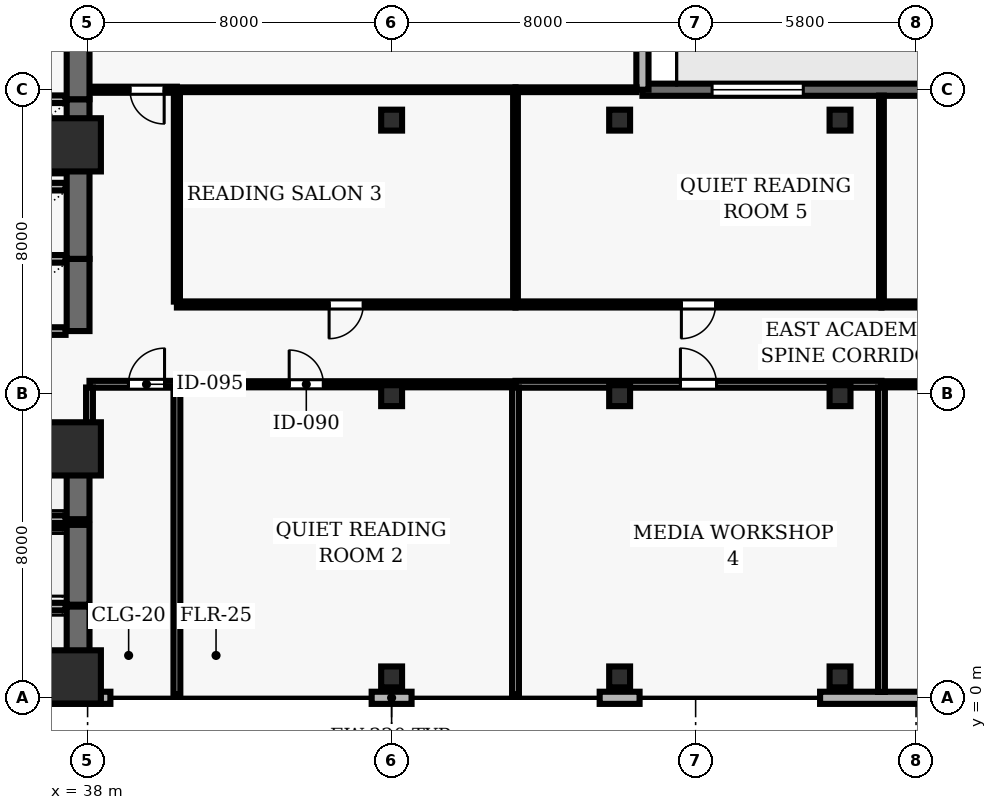
"""IFC4 building model, lengths in metres.
Left out: names, types, materials, properties, quantities, classifications, styles, units other than length and angle.
Written with IfcOpenShell. Run it as: python <this file> out.ifc"""

import sys

from ifc_helpers import new_model, si_unit, direction, frame, frame_2d, origin, origin_2d, place, context, subcontext, project, spatial, rectangle, hollow_rectangle, extrude, element, fill, save


model = new_model("IFC4")
c1 = context("Model", 3, precision=1e-05, world=origin(), true_north=direction((0.0, 1.0)))
c2 = subcontext(c1, "Body", "Model", "MODEL_VIEW")
j1 = project(units=[si_unit("LENGTHUNIT", "METRE"), si_unit("PLANEANGLEUNIT", "RADIAN")], contexts=[c1])
p1 = place(None, origin())
s1 = spatial("IfcSite", under=j1, at=p1, CompositionType="ELEMENT")
p2 = place(p1, origin())
s2 = spatial("IfcBuilding", under=s1, at=p2, CompositionType="ELEMENT")
p3 = place(p2, frame((0.0, 0.0, 54.4)))
s3 = spatial("IfcBuildingStorey", under=s2, at=p3, CompositionType="ELEMENT", Elevation=54.4)
for number, where, z_axis, x_axis in (
    (1, (37.65, 0.55, 0.0), (0.0, 0.0, 1.0), (1.0, 0.0, 0.0)),
    (2, (37.65, 6.55, 0.0), (0.0, 0.0, 1.0), (1.0, 0.0, 0.0)),
    (3, (37.65, 14.55, 0.0), (0.0, 0.0, 1.0), (1.0, 0.0, 0.0)),
):
    element("IfcColumn", number, at=place(p3, frame(where, z_axis=z_axis, x_axis=x_axis)), inside=s3, PredefinedType="COLUMN", context=c2, shape_type="SweptSolid", body=[
        extrude(rectangle(XDim=1.4, YDim=1.4, at=origin_2d()), origin(), (0.0, 0.0, 1.0), 3.9),
    ])
for number, where, z_axis, x_axis in (
    (4, (46.0, 0.55, 0.0), (0.0, 0.0, 1.0), (1.0, 0.0, 0.0)),
    (5, (46.0, 7.95, 0.0), (0.0, 0.0, 1.0), (1.0, 0.0, 0.0)),
    (6, (46.0, 15.2, 0.0), (0.0, 0.0, 1.0), (1.0, 0.0, 0.0)),
    (7, (52.0, 0.55, 0.0), (0.0, 0.0, 1.0), (1.0, 0.0, 0.0)),
    (8, (52.0, 7.95, 0.0), (0.0, 0.0, 1.0), (1.0, 0.0, 0.0)),
    (9, (52.0, 15.2, 0.0), (0.0, 0.0, 1.0), (1.0, 0.0, 0.0)),
    (10, (57.8, 0.55, 0.0), (0.0, 0.0, 1.0), (1.0, 0.0, 0.0)),
    (11, (57.8, 7.95, 0.0), (0.0, 0.0, 1.0), (1.0, 0.0, 0.0)),
    (12, (57.8, 15.2, 0.0), (0.0, 0.0, 1.0), (1.0, 0.0, 0.0)),
):
    element("IfcColumn", number, at=place(p3, frame(where, z_axis=z_axis, x_axis=x_axis)), inside=s3, PredefinedType="COLUMN", context=c2, shape_type="SweptSolid", body=[
        extrude(hollow_rectangle(XDim=0.55, YDim=0.55, WallThickness=0.025, at=origin_2d()), origin(), (0.0, 0.0, 1.0), 3.9),
    ])
p4 = place(p3, frame((30.8, 0.0, 0.0), z_axis=(0.0, 0.0, 1.0), x_axis=(1.0, 0.0, 0.0)))
e13 = element("IfcWall", 13, at=p4, inside=s3, PredefinedType="SOLIDWALL", context=c2, shape_type="SweptSolid", body=[
    extrude(rectangle(XDim=7.8, YDim=0.32, at=frame_2d((3.9, 0.0))), origin(), (0.0, 0.0, 1.0), 3.69),
])
for number, where, z_axis, x_axis in (
    (14, (45.475, 0.0, 0.0), (0.0, 0.0, 1.0), (1.0, 0.0, 0.0)),
    (15, (51.475, 0.0, 0.0), (0.0, 0.0, 1.0), (1.0, 0.0, 0.0)),
):
    element("IfcWall", number, at=place(p3, frame(where, z_axis=z_axis, x_axis=x_axis)), inside=s3, PredefinedType="SOLIDWALL", context=c2, shape_type="SweptSolid", body=[
        extrude(rectangle(XDim=1.05, YDim=0.32, at=frame_2d((0.525, 0.0))), origin(), (0.0, 0.0, 1.0), 3.69),
    ])
p5 = place(p3, frame((57.275, 0.0, 0.0), z_axis=(0.0, 0.0, 1.0), x_axis=(1.0, 0.0, 0.0)))
e16 = element("IfcWall", 16, at=p5, inside=s3, PredefinedType="SOLIDWALL", context=c2, shape_type="SweptSolid", body=[
    extrude(rectangle(XDim=16.225, YDim=0.32, at=frame_2d((8.113, 0.0))), origin(), (0.0, 0.0, 1.0), 3.69),
])
p6 = place(p3, frame((73.5, 16.0, 0.0), z_axis=(0.0, 0.0, 1.0), x_axis=(-1.0, 0.0, 0.0)))
e17 = element("IfcWall", 17, at=p6, inside=s3, PredefinedType="SOLIDWALL", context=c2, shape_type="SweptSolid", body=[
    extrude(rectangle(XDim=20.9, YDim=0.32, at=frame_2d((10.45, 0.0))), origin(), (0.0, 0.0, 1.0), 3.69),
])
p7 = place(p6, frame((12.05, 0.0, 0.0)))
e18 = element("IfcOpeningElement", 18, at=p7, cuts=e17, PredefinedType="OPENING", context=c2, shape_type="SweptSolid", body=[
    extrude(rectangle(XDim=1.0, YDim=2.2, at=frame_2d((0.5, 1.1))), frame((0.0, 0.17, 0.0), z_axis=(0.0, -1.0, 0.0), x_axis=(1.0, 0.0, 0.0)), (0.0, 0.0, 1.0), 0.34),
])
p8 = place(p6, frame((1.833, 0.0, 0.9)))
e19 = element("IfcOpeningElement", 19, at=p8, cuts=e17, PredefinedType="OPENING", context=c2, shape_type="SweptSolid", body=[
    extrude(rectangle(XDim=2.4, YDim=1.6, at=frame_2d((1.2, 0.8))), frame((0.0, 0.17, 0.0), z_axis=(0.0, -1.0, 0.0), x_axis=(1.0, 0.0, 0.0)), (0.0, 0.0, 1.0), 0.34),
])
p9 = place(p6, frame((16.667, 0.0, 0.9)))
e20 = element("IfcOpeningElement", 20, at=p9, cuts=e17, PredefinedType="OPENING", context=c2, shape_type="SweptSolid", body=[
    extrude(rectangle(XDim=2.4, YDim=1.6, at=frame_2d((1.2, 0.8))), frame((0.0, 0.17, 0.0), z_axis=(0.0, -1.0, 0.0), x_axis=(1.0, 0.0, 0.0)), (0.0, 0.0, 1.0), 0.34),
])
p10 = place(p3, frame((52.6, 16.0, 0.0), z_axis=(0.0, 0.0, 1.0), x_axis=(0.0, 1.0, 0.0)))
e21 = element("IfcWall", 21, at=p10, inside=s3, PredefinedType="SOLIDWALL", context=c2, shape_type="SweptSolid", body=[
    extrude(rectangle(XDim=10.095, YDim=0.32, at=frame_2d((5.047, 0.0))), origin(), (0.0, 0.0, 1.0), 3.69),
])
p11 = place(p10, frame((4.297, 0.0, 0.9)))
e22 = element("IfcOpeningElement", 22, at=p11, cuts=e21, PredefinedType="OPENING", context=c2, shape_type="SweptSolid", body=[
    extrude(rectangle(XDim=1.5, YDim=1.8, at=frame_2d((0.75, 0.9))), frame((0.0, 0.17, 0.0), z_axis=(0.0, -1.0, 0.0), x_axis=(1.0, 0.0, 0.0)), (0.0, 0.0, 1.0), 0.34),
])
p12 = place(p3, frame((37.75, 0.3, 0.0), z_axis=(0.0, 0.0, 1.0), x_axis=(0.0, 1.0, 0.0)))
e23 = element("IfcWall", 23, at=p12, inside=s3, PredefinedType="SHEAR", context=c2, shape_type="SweptSolid", body=[
    extrude(rectangle(XDim=2.1, YDim=0.6, at=frame_2d((1.05, 0.0))), origin(), (0.0, 0.0, 1.0), 3.69),
])
for number, where, z_axis, x_axis in (
    (24, (35.28, 0.3, 0.0), (0.0, 0.0, 1.0), (1.0, 0.0, 0.0)),
    (25, (37.42, 2.4, 0.0), (0.0, 0.0, 1.0), (-1.0, 0.0, 0.0)),
):
    element("IfcWall", number, at=place(p3, frame(where, z_axis=z_axis, x_axis=x_axis)), inside=s3, PredefinedType="SOLIDWALL", context=c2, shape_type="SweptSolid", body=[
        extrude(rectangle(XDim=2.14, YDim=0.2, at=frame_2d((1.07, 0.0))), origin(), (0.0, 0.0, 1.0), 3.69),
    ])
p13 = place(p3, frame((37.75, 2.45, 0.0), z_axis=(0.0, 0.0, 1.0), x_axis=(0.0, 1.0, 0.0)))
e26 = element("IfcWall", 26, at=p13, inside=s3, PredefinedType="SHEAR", context=c2, shape_type="SweptSolid", body=[
    extrude(rectangle(XDim=2.1, YDim=0.6, at=frame_2d((1.05, 0.0))), origin(), (0.0, 0.0, 1.0), 3.69),
])
p14 = place(p3, frame((37.42, 4.55, 0.0), z_axis=(0.0, 0.0, 1.0), x_axis=(-1.0, 0.0, 0.0)))
e27 = element("IfcWall", 27, at=p14, inside=s3, PredefinedType="SOLIDWALL", context=c2, shape_type="SweptSolid", body=[
    extrude(rectangle(XDim=2.14, YDim=0.2, at=frame_2d((1.07, 0.0))), origin(), (0.0, 0.0, 1.0), 3.69),
])
p15 = place(p3, frame((37.75, 4.7, 0.0), z_axis=(0.0, 0.0, 1.0), x_axis=(0.0, 1.0, 0.0)))
e28 = element("IfcWall", 28, at=p15, inside=s3, PredefinedType="SHEAR", context=c2, shape_type="SweptSolid", body=[
    extrude(rectangle(XDim=2.25, YDim=0.6, at=frame_2d((1.125, 0.0))), origin(), (0.0, 0.0, 1.0), 3.69),
])
for number, where, z_axis, x_axis in (
    (29, (35.28, 4.7, 0.0), (0.0, 0.0, 1.0), (1.0, 0.0, 0.0)),
    (30, (37.42, 6.95, 0.0), (0.0, 0.0, 1.0), (-1.0, 0.0, 0.0)),
):
    element("IfcWall", number, at=place(p3, frame(where, z_axis=z_axis, x_axis=x_axis)), inside=s3, PredefinedType="SOLIDWALL", context=c2, shape_type="SweptSolid", body=[
        extrude(rectangle(XDim=2.14, YDim=0.2, at=frame_2d((1.07, 0.0))), origin(), (0.0, 0.0, 1.0), 3.69),
    ])
p16 = place(p3, frame((37.75, 9.65, 0.0), z_axis=(0.0, 0.0, 1.0), x_axis=(0.0, 1.0, 0.0)))
e31 = element("IfcWall", 31, at=p16, inside=s3, PredefinedType="SHEAR", context=c2, shape_type="SweptSolid", body=[
    extrude(rectangle(XDim=1.9, YDim=0.6, at=frame_2d((0.95, 0.0))), origin(), (0.0, 0.0, 1.0), 3.69),
])
for number, where, z_axis, x_axis in (
    (32, (35.28, 9.65, 0.0), (0.0, 0.0, 1.0), (1.0, 0.0, 0.0)),
    (33, (37.42, 11.55, 0.0), (0.0, 0.0, 1.0), (-1.0, 0.0, 0.0)),
):
    element("IfcWall", number, at=place(p3, frame(where, z_axis=z_axis, x_axis=x_axis)), inside=s3, PredefinedType="SOLIDWALL", context=c2, shape_type="SweptSolid", body=[
        extrude(rectangle(XDim=2.14, YDim=0.2, at=frame_2d((1.07, 0.0))), origin(), (0.0, 0.0, 1.0), 3.69),
    ])
p17 = place(p3, frame((37.75, 11.55, 0.0), z_axis=(0.0, 0.0, 1.0), x_axis=(0.0, 1.0, 0.0)))
e34 = element("IfcWall", 34, at=p17, inside=s3, PredefinedType="SHEAR", context=c2, shape_type="SweptSolid", body=[
    extrude(rectangle(XDim=2.35, YDim=0.6, at=frame_2d((1.175, 0.0))), origin(), (0.0, 0.0, 1.0), 3.69),
])
p18 = place(p3, frame((37.42, 13.45, 0.0), z_axis=(0.0, 0.0, 1.0), x_axis=(-1.0, 0.0, 0.0)))
e35 = element("IfcWall", 35, at=p18, inside=s3, PredefinedType="SOLIDWALL", context=c2, shape_type="SweptSolid", body=[
    extrude(rectangle(XDim=2.14, YDim=0.2, at=frame_2d((1.07, 0.0))), origin(), (0.0, 0.0, 1.0), 3.69),
])
p19 = place(p3, frame((37.75, 13.9, 0.0), z_axis=(0.0, 0.0, 1.0), x_axis=(0.0, 1.0, 0.0)))
e36 = element("IfcWall", 36, at=p19, inside=s3, PredefinedType="SHEAR", context=c2, shape_type="SweptSolid", body=[
    extrude(rectangle(XDim=1.85, YDim=0.6, at=frame_2d((0.925, 0.0))), origin(), (0.0, 0.0, 1.0), 3.69),
])
for number, where, z_axis, x_axis in (
    (37, (35.28, 13.9, 0.0), (0.0, 0.0, 1.0), (1.0, 0.0, 0.0)),
    (38, (37.42, 15.75, 0.0), (0.0, 0.0, 1.0), (-1.0, 0.0, 0.0)),
):
    element("IfcWall", number, at=place(p3, frame(where, z_axis=z_axis, x_axis=x_axis)), inside=s3, PredefinedType="SOLIDWALL", context=c2, shape_type="SweptSolid", body=[
        extrude(rectangle(XDim=2.14, YDim=0.2, at=frame_2d((1.07, 0.0))), origin(), (0.0, 0.0, 1.0), 3.69),
    ])
p20 = place(p3, frame((37.75, 15.75, 0.0), z_axis=(0.0, 0.0, 1.0), x_axis=(0.0, 1.0, 0.0)))
e39 = element("IfcWall", 39, at=p20, inside=s3, PredefinedType="SHEAR", context=c2, shape_type="SweptSolid", body=[
    extrude(rectangle(XDim=1.85, YDim=0.6, at=frame_2d((0.925, 0.0))), origin(), (0.0, 0.0, 1.0), 3.69),
])
p21 = place(p3, frame((38.05, 8.25, 0.0), z_axis=(0.0, 0.0, 1.0), x_axis=(1.0, 0.0, 0.0)))
e40 = element("IfcWall", 40, at=p21, inside=s3, PredefinedType="PARTITIONING", context=c2, shape_type="SweptSolid", body=[
    extrude(rectangle(XDim=2.3, YDim=0.18, at=frame_2d((1.15, 0.0))), origin(), (0.0, 0.0, 1.0), 2.995),
])
p22 = place(p21, frame((1.025, 0.0, 0.0)))
e41 = element("IfcOpeningElement", 41, at=p22, cuts=e40, PredefinedType="OPENING", context=c2, shape_type="SweptSolid", body=[
    extrude(rectangle(XDim=0.95, YDim=2.1, at=frame_2d((0.475, 1.05))), frame((0.0, 0.1, 0.0), z_axis=(0.0, -1.0, 0.0), x_axis=(1.0, 0.0, 0.0)), (0.0, 0.0, 1.0), 0.2),
])
p23 = place(p3, frame((40.35, 8.25, 0.0), z_axis=(0.0, 0.0, 1.0), x_axis=(1.0, 0.0, 0.0)))
e42 = element("IfcWall", 42, at=p23, inside=s3, PredefinedType="PARTITIONING", context=c2, shape_type="SweptSolid", body=[
    extrude(rectangle(XDim=8.91, YDim=0.16, at=frame_2d((4.455, 0.0))), origin(), (0.0, 0.0, 1.0), 2.995),
])
p24 = place(p23, frame((2.955, 0.0, 0.0)))
e43 = element("IfcOpeningElement", 43, at=p24, cuts=e42, PredefinedType="OPENING", context=c2, shape_type="SweptSolid", body=[
    extrude(rectangle(XDim=0.9, YDim=2.1, at=frame_2d((0.45, 1.05))), frame((0.0, 0.09, 0.0), z_axis=(0.0, -1.0, 0.0), x_axis=(1.0, 0.0, 0.0)), (0.0, 0.0, 1.0), 0.18),
])
p25 = place(p3, frame((40.35, 16.0, 0.0), z_axis=(0.0, 0.0, 1.0), x_axis=(-1.0, 0.0, 0.0)))
e44 = element("IfcWall", 44, at=p25, inside=s3, PredefinedType="PARTITIONING", context=c2, shape_type="SweptSolid", body=[
    extrude(rectangle(XDim=2.27, YDim=0.16, at=frame_2d((1.135, 0.0))), origin(), (0.0, 0.0, 1.0), 3.69),
])
p26 = place(p25, frame((0.335, 0.0, 0.0)))
e45 = element("IfcOpeningElement", 45, at=p26, cuts=e44, PredefinedType="OPENING", context=c2, shape_type="SweptSolid", body=[
    extrude(rectangle(XDim=0.9, YDim=2.1, at=frame_2d((0.45, 1.05))), frame((0.0, 0.09, 0.0), z_axis=(0.0, -1.0, 0.0), x_axis=(1.0, 0.0, 0.0)), (0.0, 0.0, 1.0), 0.18),
])
p27 = place(p3, frame((49.26, 8.25, 0.0), z_axis=(0.0, 0.0, 1.0), x_axis=(1.0, 0.0, 0.0)))
e46 = element("IfcWall", 46, at=p27, inside=s3, PredefinedType="PARTITIONING", context=c2, shape_type="SweptSolid", body=[
    extrude(rectangle(XDim=9.63, YDim=0.18, at=frame_2d((4.815, 0.0))), origin(), (0.0, 0.0, 1.0), 2.995),
])
p28 = place(p27, frame((4.34, 0.0, 0.0)))
e47 = element("IfcOpeningElement", 47, at=p28, cuts=e46, PredefinedType="OPENING", context=c2, shape_type="SweptSolid", body=[
    extrude(rectangle(XDim=0.95, YDim=2.1, at=frame_2d((0.475, 1.05))), frame((0.0, 0.1, 0.0), z_axis=(0.0, -1.0, 0.0), x_axis=(1.0, 0.0, 0.0)), (0.0, 0.0, 1.0), 0.2),
])
p29 = place(p3, frame((49.26, 10.35, 0.0), z_axis=(0.0, 0.0, 1.0), x_axis=(-1.0, 0.0, 0.0)))
e48 = element("IfcWall", 48, at=p29, inside=s3, PredefinedType="PARTITIONING", context=c2, shape_type="SweptSolid", body=[
    extrude(rectangle(XDim=8.91, YDim=0.16, at=frame_2d((4.455, 0.0))), origin(), (0.0, 0.0, 1.0), 3.227),
])
p30 = place(p29, frame((4.005, 0.0, 0.0)))
e49 = element("IfcOpeningElement", 49, at=p30, cuts=e48, PredefinedType="OPENING", context=c2, shape_type="SweptSolid", body=[
    extrude(rectangle(XDim=0.9, YDim=2.1, at=frame_2d((0.45, 1.05))), frame((0.0, 0.09, 0.0), z_axis=(0.0, -1.0, 0.0), x_axis=(1.0, 0.0, 0.0)), (0.0, 0.0, 1.0), 0.18),
])
p31 = place(p3, frame((49.26, 16.0, 0.0), z_axis=(0.0, 0.0, 1.0), x_axis=(1.0, 0.0, 0.0)))
e50 = element("IfcWall", 50, at=p31, inside=s3, PredefinedType="PARTITIONING", context=c2, shape_type="SweptSolid", body=[
    extrude(rectangle(XDim=3.185, YDim=0.125, at=frame_2d((1.593, 0.0))), origin(), (0.0, 0.0, 1.0), 3.39),
])
p32 = place(p3, frame((49.26, 16.0, 0.0), z_axis=(0.0, 0.0, 1.0), x_axis=(-1.0, 0.0, 0.0)))
e51 = element("IfcWall", 51, at=p32, inside=s3, PredefinedType="PARTITIONING", context=c2, shape_type="SweptSolid", body=[
    extrude(rectangle(XDim=8.91, YDim=0.125, at=frame_2d((4.455, 0.0))), origin(), (0.0, 0.0, 1.0), 3.69),
])
p33 = place(p3, frame((58.89, 8.25, 0.0), z_axis=(0.0, 0.0, 1.0), x_axis=(1.0, 0.0, 0.0)))
e52 = element("IfcWall", 52, at=p33, inside=s3, PredefinedType="PARTITIONING", context=c2, shape_type="SweptSolid", body=[
    extrude(rectangle(XDim=9.71, YDim=0.16, at=frame_2d((4.855, 0.0))), origin(), (0.0, 0.0, 1.0), 3.69),
])
p34 = place(p33, frame((4.405, 0.0, 0.0)))
e53 = element("IfcOpeningElement", 53, at=p34, cuts=e52, PredefinedType="OPENING", context=c2, shape_type="SweptSolid", body=[
    extrude(rectangle(XDim=0.9, YDim=2.1, at=frame_2d((0.45, 1.05))), frame((0.0, 0.09, 0.0), z_axis=(0.0, -1.0, 0.0), x_axis=(1.0, 0.0, 0.0)), (0.0, 0.0, 1.0), 0.18),
])
p35 = place(p3, frame((58.89, 10.35, 0.0), z_axis=(0.0, 0.0, 1.0), x_axis=(-1.0, 0.0, 0.0)))
e54 = element("IfcWall", 54, at=p35, inside=s3, PredefinedType="PARTITIONING", context=c2, shape_type="SweptSolid", body=[
    extrude(rectangle(XDim=9.63, YDim=0.16, at=frame_2d((4.815, 0.0))), origin(), (0.0, 0.0, 1.0), 3.227),
])
p36 = place(p35, frame((4.365, 0.0, 0.0)))
e55 = element("IfcOpeningElement", 55, at=p36, cuts=e54, PredefinedType="OPENING", context=c2, shape_type="SweptSolid", body=[
    extrude(rectangle(XDim=0.9, YDim=2.1, at=frame_2d((0.45, 1.05))), frame((0.0, 0.09, 0.0), z_axis=(0.0, -1.0, 0.0), x_axis=(1.0, 0.0, 0.0)), (0.0, 0.0, 1.0), 0.18),
])
p37 = place(p3, frame((68.6, 10.35, 0.0), z_axis=(0.0, 0.0, 1.0), x_axis=(-1.0, 0.0, 0.0)))
e56 = element("IfcWall", 56, at=p37, inside=s3, PredefinedType="PARTITIONING", context=c2, shape_type="SweptSolid", body=[
    extrude(rectangle(XDim=9.71, YDim=0.16, at=frame_2d((4.855, 0.0))), origin(), (0.0, 0.0, 1.0), 3.227),
])
p38 = place(p37, frame((4.405, 0.0, 0.0)))
e57 = element("IfcOpeningElement", 57, at=p38, cuts=e56, PredefinedType="OPENING", context=c2, shape_type="SweptSolid", body=[
    extrude(rectangle(XDim=0.9, YDim=2.1, at=frame_2d((0.45, 1.05))), frame((0.0, 0.09, 0.0), z_axis=(0.0, -1.0, 0.0), x_axis=(1.0, 0.0, 0.0)), (0.0, 0.0, 1.0), 0.18),
])
p39 = place(p3, frame((38.05, 7.05, 0.0), z_axis=(0.0, 0.0, 1.0), x_axis=(0.0, 1.0, 0.0)))
e58 = element("IfcWall", 58, at=p39, inside=s3, PredefinedType="PARTITIONING", context=c2, shape_type="SweptSolid", body=[
    extrude(rectangle(XDim=1.115, YDim=0.18, at=frame_2d((0.558, 0.0))), origin(), (0.0, 0.0, 1.0), 2.995),
])
p40 = place(p3, frame((40.35, 0.09, 0.0), z_axis=(0.0, 0.0, 1.0), x_axis=(0.0, 1.0, 0.0)))
e59 = element("IfcWall", 59, at=p40, inside=s3, PredefinedType="PARTITIONING", context=c2, shape_type="SweptSolid", body=[
    extrude(rectangle(XDim=8.075, YDim=0.18, at=frame_2d((4.038, 0.0))), origin(), (0.0, 0.0, 1.0), 3.69),
])
p41 = place(p3, frame((40.35, 10.425, 0.0), z_axis=(0.0, 0.0, 1.0), x_axis=(0.0, 1.0, 0.0)))
e60 = element("IfcWall", 60, at=p41, inside=s3, PredefinedType="PARTITIONING", context=c2, shape_type="SweptSolid", body=[
    extrude(rectangle(XDim=5.5, YDim=0.16, at=frame_2d((2.75, 0.0))), origin(), (0.0, 0.0, 1.0), 3.227),
])
p42 = place(p3, frame((49.26, 0.09, 0.0), z_axis=(0.0, 0.0, 1.0), x_axis=(0.0, 1.0, 0.0)))
e61 = element("IfcWall", 61, at=p42, inside=s3, PredefinedType="PARTITIONING", context=c2, shape_type="SweptSolid", body=[
    extrude(rectangle(XDim=8.075, YDim=0.18, at=frame_2d((4.038, 0.0))), origin(), (0.0, 0.0, 1.0), 3.69),
])
p43 = place(p3, frame((49.26, 10.425, 0.0), z_axis=(0.0, 0.0, 1.0), x_axis=(0.0, 1.0, 0.0)))
e62 = element("IfcWall", 62, at=p43, inside=s3, PredefinedType="PARTITIONING", context=c2, shape_type="SweptSolid", body=[
    extrude(rectangle(XDim=5.518, YDim=0.125, at=frame_2d((2.759, 0.0))), origin(), (0.0, 0.0, 1.0), 3.69),
])
p44 = place(p3, frame((58.89, 0.155, 0.0), z_axis=(0.0, 0.0, 1.0), x_axis=(0.0, 1.0, 0.0)))
e63 = element("IfcWall", 63, at=p44, inside=s3, PredefinedType="PARTITIONING", context=c2, shape_type="SweptSolid", body=[
    extrude(rectangle(XDim=8.01, YDim=0.18, at=frame_2d((4.005, 0.0))), origin(), (0.0, 0.0, 1.0), 3.69),
])
p45 = place(p3, frame((58.89, 10.425, 0.0), z_axis=(0.0, 0.0, 1.0), x_axis=(0.0, 1.0, 0.0)))
e64 = element("IfcWall", 64, at=p45, inside=s3, PredefinedType="PARTITIONING", context=c2, shape_type="SweptSolid", body=[
    extrude(rectangle(XDim=5.42, YDim=0.125, at=frame_2d((2.71, 0.0))), origin(), (0.0, 0.0, 1.0), 3.69),
])
p46 = place(p9, origin())
e65 = element("IfcWindow", 65, at=p46, inside=s3, PartitioningType="SINGLE_PANEL", PredefinedType="WINDOW", context=c2, shape_type="SweptSolid", body=[
    extrude(rectangle(XDim=2.4, YDim=1.6, at=frame_2d((1.2, 0.8))), frame((0.0, 0.03, 0.0), z_axis=(0.0, -1.0, 0.0), x_axis=(1.0, 0.0, 0.0)), (0.0, 0.0, 1.0), 0.06),
])
fill(e20, e65)
p47 = place(p22, origin())
e66 = element("IfcDoor", 66, at=p47, inside=s3, OperationType="SINGLE_SWING_RIGHT", PredefinedType="DOOR", context=c2, shape_type="SweptSolid", body=[
    extrude(rectangle(XDim=0.95, YDim=2.1, at=frame_2d((0.475, 1.05))), frame((0.0, 0.025, 0.0), z_axis=(0.0, -1.0, 0.0), x_axis=(1.0, 0.0, 0.0)), (0.0, 0.0, 1.0), 0.05),
])
fill(e41, e66)
p48 = place(p24, origin())
e67 = element("IfcDoor", 67, at=p48, inside=s3, OperationType="SINGLE_SWING_LEFT", PredefinedType="DOOR", context=c2, shape_type="SweptSolid", body=[
    extrude(rectangle(XDim=0.9, YDim=2.1, at=frame_2d((0.45, 1.05))), frame((0.0, 0.025, 0.0), z_axis=(0.0, -1.0, 0.0), x_axis=(1.0, 0.0, 0.0)), (0.0, 0.0, 1.0), 0.05),
])
fill(e43, e67)
p49 = place(p30, origin())
e68 = element("IfcDoor", 68, at=p49, inside=s3, OperationType="SINGLE_SWING_RIGHT", PredefinedType="DOOR", context=c2, shape_type="SweptSolid", body=[
    extrude(rectangle(XDim=0.9, YDim=2.1, at=frame_2d((0.45, 1.05))), frame((0.0, 0.025, 0.0), z_axis=(0.0, -1.0, 0.0), x_axis=(1.0, 0.0, 0.0)), (0.0, 0.0, 1.0), 0.05),
])
fill(e49, e68)
p50 = place(p28, origin())
e69 = element("IfcDoor", 69, at=p50, inside=s3, OperationType="SINGLE_SWING_LEFT", PredefinedType="DOOR", context=c2, shape_type="SweptSolid", body=[
    extrude(rectangle(XDim=0.95, YDim=2.1, at=frame_2d((0.475, 1.05))), frame((0.0, 0.025, 0.0), z_axis=(0.0, -1.0, 0.0), x_axis=(1.0, 0.0, 0.0)), (0.0, 0.0, 1.0), 0.05),
])
fill(e47, e69)
p51 = place(p36, origin())
e70 = element("IfcDoor", 70, at=p51, inside=s3, OperationType="SINGLE_SWING_RIGHT", PredefinedType="DOOR", context=c2, shape_type="SweptSolid", body=[
    extrude(rectangle(XDim=0.9, YDim=2.1, at=frame_2d((0.45, 1.05))), frame((0.0, 0.025, 0.0), z_axis=(0.0, -1.0, 0.0), x_axis=(1.0, 0.0, 0.0)), (0.0, 0.0, 1.0), 0.05),
])
fill(e55, e70)
p52 = place(p26, origin())
e71 = element("IfcDoor", 71, at=p52, inside=s3, OperationType="SINGLE_SWING_LEFT", PredefinedType="DOOR", context=c2, shape_type="SweptSolid", body=[
    extrude(rectangle(XDim=0.9, YDim=2.1, at=frame_2d((0.45, 1.05))), frame((0.0, 0.025, 0.0), z_axis=(0.0, -1.0, 0.0), x_axis=(1.0, 0.0, 0.0)), (0.0, 0.0, 1.0), 0.05),
])
fill(e45, e71)
save(model, sys.argv[1])
